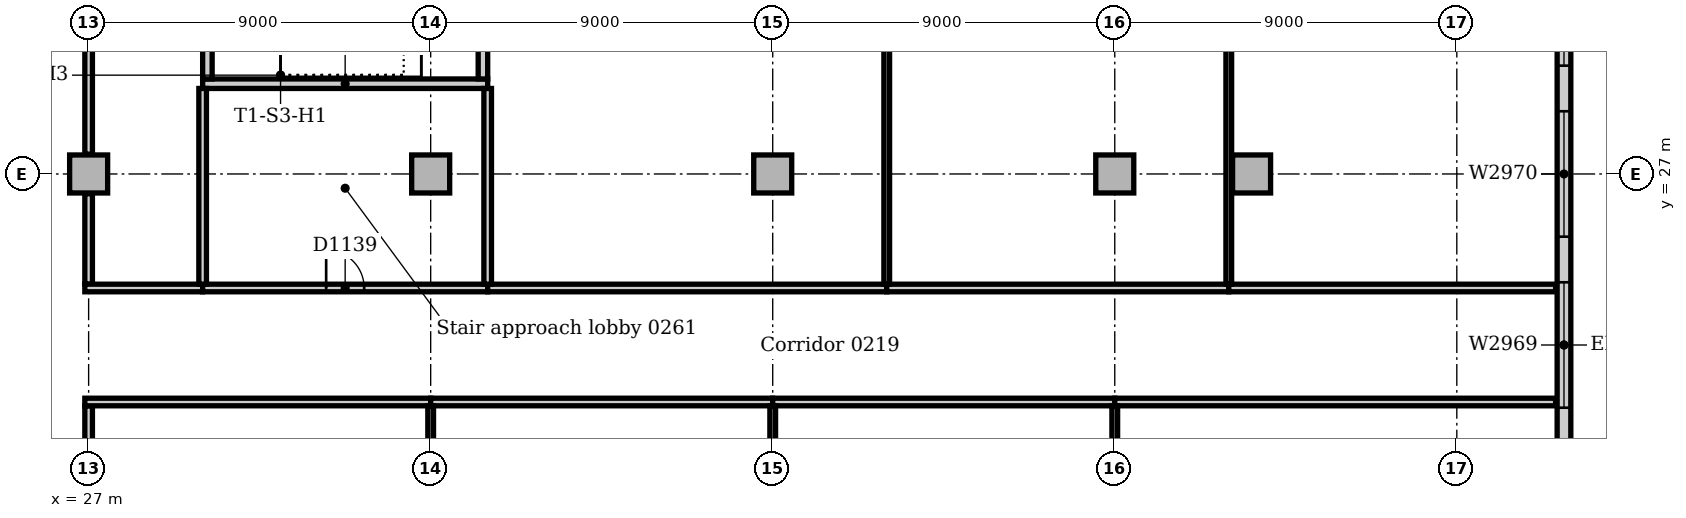
"""IFC4 building model, lengths in metres.
Left out: names, types, materials, properties, quantities, classifications, styles, units other than length and angle.
Written with IfcOpenShell. Run it as: python <this file> out.ifc"""

import sys

from ifc_helpers import new_model, si_unit, direction, frame, frame_2d, origin, origin_2d, place, context, subcontext, project, spatial, rectangle, extrude, element, fill, save


model = new_model("IFC4")
c1 = context("Model", 3, precision=1e-05, world=origin(), true_north=direction((0.0, 1.0)))
c2 = subcontext(c1, "Body", "Model", "MODEL_VIEW")
j1 = project(units=[si_unit("LENGTHUNIT", "METRE"), si_unit("PLANEANGLEUNIT", "RADIAN")], contexts=[c1])
p1 = place(None, origin())
s1 = spatial("IfcSite", under=j1, at=p1, CompositionType="ELEMENT")
p2 = place(p1, origin())
s2 = spatial("IfcBuilding", under=s1, at=p2, CompositionType="ELEMENT")
p3 = place(p2, frame((0.0, 0.0, 11.0)))
s3 = spatial("IfcBuildingStorey", under=s2, at=p3, CompositionType="ELEMENT", Elevation=11.0)
p4 = place(p3, frame((30.0, 29.375, 0.0), z_axis=(0.0, 0.0, 1.0), x_axis=(1.0, 0.0, 0.0)))
e1 = element("IfcWall", 1, at=p4, inside=s3, PredefinedType="SOLIDWALL", context=c2, shape_type="SweptSolid", body=[
    extrude(rectangle(XDim=7.5, YDim=0.25, at=frame_2d((3.75, 0.0))), origin(), (0.0, 0.0, 1.0), 5.0),
])
for number, where, z_axis, x_axis in (
    (2, (37.375, 29.5, 0.0), (0.0, 0.0, 1.0), (0.0, 1.0, 0.0)),
    (3, (30.125, 33.5, 0.0), (0.0, 0.0, 1.0), (0.0, -1.0, 0.0)),
):
    element("IfcWall", number, at=place(p3, frame(where, z_axis=z_axis, x_axis=x_axis)), inside=s3, PredefinedType="SOLIDWALL", context=c2, shape_type="SweptSolid", body=[
        extrude(rectangle(XDim=4.0, YDim=0.25, at=frame_2d((2.0, 0.0))), origin(), (0.0, 0.0, 1.0), 5.0),
    ])
for number, where, z_axis, x_axis in (
    (4, (57.6, 27.0, 0.0), (0.0, 0.0, 1.0), (1.0, 0.0, 0.0)),
    (5, (27.0, 27.0, 0.0), (0.0, 0.0, 1.0), (1.0, 0.0, 0.0)),
    (6, (36.0, 27.0, 0.0), (0.0, 0.0, 1.0), (1.0, 0.0, 0.0)),
    (7, (45.0, 27.0, 0.0), (0.0, 0.0, 1.0), (1.0, 0.0, 0.0)),
    (8, (54.0, 27.0, 0.0), (0.0, 0.0, 1.0), (1.0, 0.0, 0.0)),
):
    element("IfcColumn", number, at=place(p3, frame(where, z_axis=z_axis, x_axis=x_axis)), inside=s3, PredefinedType="COLUMN", context=c2, shape_type="SweptSolid", body=[
        extrude(rectangle(XDim=1.0, YDim=1.0, at=origin_2d()), origin(), (0.0, 0.0, 1.0), 4.7),
    ])
p5 = place(p3, frame((65.82, -9.0, 0.0), z_axis=(0.0, 0.0, 1.0), x_axis=(0.0, 1.0, 0.0)))
e9 = element("IfcWall", 9, at=p5, inside=s3, PredefinedType="STANDARD", context=c2, shape_type="SweptSolid", body=[
    extrude(rectangle(XDim=63.0, YDim=0.36, at=frame_2d((31.5, 0.0))), origin(), (0.0, 0.0, 1.0), 4.7),
])
p6 = place(p5, frame((2.85, 0.0, 0.9)))
e10 = element("IfcOpeningElement", 10, at=p6, cuts=e9, PredefinedType="OPENING", context=c2, shape_type="SweptSolid", body=[
    extrude(rectangle(XDim=3.3, YDim=2.4, at=frame_2d((1.65, 1.2))), frame((0.0, 0.19, 0.0), z_axis=(0.0, -1.0, 0.0), x_axis=(1.0, 0.0, 0.0)), (0.0, 0.0, 1.0), 0.38),
])
p7 = place(p5, frame((7.35, 0.0, 0.9)))
e11 = element("IfcOpeningElement", 11, at=p7, cuts=e9, PredefinedType="OPENING", context=c2, shape_type="SweptSolid", body=[
    extrude(rectangle(XDim=3.3, YDim=2.4, at=frame_2d((1.65, 1.2))), frame((0.0, 0.19, 0.0), z_axis=(0.0, -1.0, 0.0), x_axis=(1.0, 0.0, 0.0)), (0.0, 0.0, 1.0), 0.38),
])
p8 = place(p5, frame((11.85, 0.0, 0.9)))
e12 = element("IfcOpeningElement", 12, at=p8, cuts=e9, PredefinedType="OPENING", context=c2, shape_type="SweptSolid", body=[
    extrude(rectangle(XDim=3.3, YDim=2.4, at=frame_2d((1.65, 1.2))), frame((0.0, 0.19, 0.0), z_axis=(0.0, -1.0, 0.0), x_axis=(1.0, 0.0, 0.0)), (0.0, 0.0, 1.0), 0.38),
])
p9 = place(p5, frame((16.35, 0.0, 0.9)))
e13 = element("IfcOpeningElement", 13, at=p9, cuts=e9, PredefinedType="OPENING", context=c2, shape_type="SweptSolid", body=[
    extrude(rectangle(XDim=3.3, YDim=2.4, at=frame_2d((1.65, 1.2))), frame((0.0, 0.19, 0.0), z_axis=(0.0, -1.0, 0.0), x_axis=(1.0, 0.0, 0.0)), (0.0, 0.0, 1.0), 0.38),
])
p10 = place(p5, frame((20.85, 0.0, 0.9)))
e14 = element("IfcOpeningElement", 14, at=p10, cuts=e9, PredefinedType="OPENING", context=c2, shape_type="SweptSolid", body=[
    extrude(rectangle(XDim=3.3, YDim=2.4, at=frame_2d((1.65, 1.2))), frame((0.0, 0.19, 0.0), z_axis=(0.0, -1.0, 0.0), x_axis=(1.0, 0.0, 0.0)), (0.0, 0.0, 1.0), 0.38),
])
p11 = place(p5, frame((25.35, 0.0, 0.9)))
e15 = element("IfcOpeningElement", 15, at=p11, cuts=e9, PredefinedType="OPENING", context=c2, shape_type="SweptSolid", body=[
    extrude(rectangle(XDim=3.3, YDim=2.4, at=frame_2d((1.65, 1.2))), frame((0.0, 0.19, 0.0), z_axis=(0.0, -1.0, 0.0), x_axis=(1.0, 0.0, 0.0)), (0.0, 0.0, 1.0), 0.38),
])
p12 = place(p5, frame((29.85, 0.0, 0.9)))
e16 = element("IfcOpeningElement", 16, at=p12, cuts=e9, PredefinedType="OPENING", context=c2, shape_type="SweptSolid", body=[
    extrude(rectangle(XDim=3.3, YDim=2.4, at=frame_2d((1.65, 1.2))), frame((0.0, 0.19, 0.0), z_axis=(0.0, -1.0, 0.0), x_axis=(1.0, 0.0, 0.0)), (0.0, 0.0, 1.0), 0.38),
])
p13 = place(p5, frame((34.35, 0.0, 0.9)))
e17 = element("IfcOpeningElement", 17, at=p13, cuts=e9, PredefinedType="OPENING", context=c2, shape_type="SweptSolid", body=[
    extrude(rectangle(XDim=3.3, YDim=2.4, at=frame_2d((1.65, 1.2))), frame((0.0, 0.19, 0.0), z_axis=(0.0, -1.0, 0.0), x_axis=(1.0, 0.0, 0.0)), (0.0, 0.0, 1.0), 0.38),
])
p14 = place(p5, frame((38.85, 0.0, 0.9)))
e18 = element("IfcOpeningElement", 18, at=p14, cuts=e9, PredefinedType="OPENING", context=c2, shape_type="SweptSolid", body=[
    extrude(rectangle(XDim=3.3, YDim=2.4, at=frame_2d((1.65, 1.2))), frame((0.0, 0.19, 0.0), z_axis=(0.0, -1.0, 0.0), x_axis=(1.0, 0.0, 0.0)), (0.0, 0.0, 1.0), 0.38),
])
p15 = place(p5, frame((43.35, 0.0, 0.9)))
e19 = element("IfcOpeningElement", 19, at=p15, cuts=e9, PredefinedType="OPENING", context=c2, shape_type="SweptSolid", body=[
    extrude(rectangle(XDim=3.3, YDim=2.4, at=frame_2d((1.65, 1.2))), frame((0.0, 0.19, 0.0), z_axis=(0.0, -1.0, 0.0), x_axis=(1.0, 0.0, 0.0)), (0.0, 0.0, 1.0), 0.38),
])
p16 = place(p5, frame((47.85, 0.0, 0.9)))
e20 = element("IfcOpeningElement", 20, at=p16, cuts=e9, PredefinedType="OPENING", context=c2, shape_type="SweptSolid", body=[
    extrude(rectangle(XDim=3.3, YDim=2.4, at=frame_2d((1.65, 1.2))), frame((0.0, 0.19, 0.0), z_axis=(0.0, -1.0, 0.0), x_axis=(1.0, 0.0, 0.0)), (0.0, 0.0, 1.0), 0.38),
])
p17 = place(p5, frame((52.35, 0.0, 0.9)))
e21 = element("IfcOpeningElement", 21, at=p17, cuts=e9, PredefinedType="OPENING", context=c2, shape_type="SweptSolid", body=[
    extrude(rectangle(XDim=3.3, YDim=2.4, at=frame_2d((1.65, 1.2))), frame((0.0, 0.19, 0.0), z_axis=(0.0, -1.0, 0.0), x_axis=(1.0, 0.0, 0.0)), (0.0, 0.0, 1.0), 0.38),
])
p18 = place(p5, frame((56.85, 0.0, 0.9)))
e22 = element("IfcOpeningElement", 22, at=p18, cuts=e9, PredefinedType="OPENING", context=c2, shape_type="SweptSolid", body=[
    extrude(rectangle(XDim=3.3, YDim=2.4, at=frame_2d((1.65, 1.2))), frame((0.0, 0.19, 0.0), z_axis=(0.0, -1.0, 0.0), x_axis=(1.0, 0.0, 0.0)), (0.0, 0.0, 1.0), 0.38),
])
for number, where, z_axis, x_axis in (
    (23, (27.0, 18.52, 0.0), (0.0, 0.0, 1.0), (0.0, 1.0, 0.0)),
    (24, (27.0, 24.1, 0.0), (0.0, 0.0, 1.0), (0.0, 1.0, 0.0)),
):
    element("IfcWall", number, at=place(p3, frame(where, z_axis=z_axis, x_axis=x_axis)), inside=s3, PredefinedType="PARTITIONING", context=c2, shape_type="SweptSolid", body=[
        extrude(rectangle(XDim=2.38, YDim=0.2, at=frame_2d((1.19, 0.0))), origin(), (0.0, 0.0, 1.0), 4.7),
    ])
p19 = place(p3, frame((27.0, 27.52, 0.0), z_axis=(0.0, 0.0, 1.0), x_axis=(0.0, 1.0, 0.0)))
e25 = element("IfcWall", 25, at=p19, inside=s3, PredefinedType="PARTITIONING", context=c2, shape_type="SweptSolid", body=[
    extrude(rectangle(XDim=7.96, YDim=0.2, at=frame_2d((3.98, 0.0))), origin(), (0.0, 0.0, 1.0), 4.7),
])
p20 = place(p19, frame((4.98, 0.0, 0.0)))
e26 = element("IfcOpeningElement", 26, at=p20, cuts=e25, PredefinedType="OPENING", context=c2, shape_type="SweptSolid", body=[
    extrude(rectangle(XDim=1.0, YDim=2.1, at=frame_2d((0.5, 1.05))), frame((0.0, 0.11, 0.0), z_axis=(0.0, -1.0, 0.0), x_axis=(1.0, 0.0, 0.0)), (0.0, 0.0, 1.0), 0.22),
])
p21 = place(p3, frame((26.9, 21.0, 0.0), z_axis=(0.0, 0.0, 1.0), x_axis=(1.0, 0.0, 0.0)))
e27 = element("IfcWall", 27, at=p21, inside=s3, PredefinedType="PARTITIONING", context=c2, shape_type="SweptSolid", body=[
    extrude(rectangle(XDim=9.1, YDim=0.2, at=frame_2d((4.55, 0.0))), origin(), (0.0, 0.0, 1.0), 4.7),
])
for number, where, z_axis, x_axis in (
    (28, (36.0, 21.0, 0.0), (0.0, 0.0, 1.0), (1.0, 0.0, 0.0)),
    (29, (45.0, 21.0, 0.0), (0.0, 0.0, 1.0), (1.0, 0.0, 0.0)),
):
    element("IfcWall", number, at=place(p3, frame(where, z_axis=z_axis, x_axis=x_axis)), inside=s3, PredefinedType="PARTITIONING", context=c2, shape_type="SweptSolid", body=[
        extrude(rectangle(XDim=9.0, YDim=0.2, at=frame_2d((4.5, 0.0))), origin(), (0.0, 0.0, 1.0), 4.7),
    ])
p22 = place(p3, frame((54.0, 21.0, 0.0), z_axis=(0.0, 0.0, 1.0), x_axis=(1.0, 0.0, 0.0)))
e30 = element("IfcWall", 30, at=p22, inside=s3, PredefinedType="PARTITIONING", context=c2, shape_type="SweptSolid", body=[
    extrude(rectangle(XDim=11.6, YDim=0.2, at=frame_2d((5.8, 0.0))), origin(), (0.0, 0.0, 1.0), 4.7),
])
p23 = place(p3, frame((26.9, 24.0, 0.0), z_axis=(0.0, 0.0, 1.0), x_axis=(1.0, 0.0, 0.0)))
e31 = element("IfcWall", 31, at=p23, inside=s3, PredefinedType="PARTITIONING", context=c2, shape_type="SweptSolid", body=[
    extrude(rectangle(XDim=3.1, YDim=0.2, at=frame_2d((1.55, 0.0))), origin(), (0.0, 0.0, 1.0), 4.7),
])
p24 = place(p3, frame((30.0, 24.0, 0.0), z_axis=(0.0, 0.0, 1.0), x_axis=(1.0, 0.0, 0.0)))
e32 = element("IfcWall", 32, at=p24, inside=s3, PredefinedType="PARTITIONING", context=c2, shape_type="SweptSolid", body=[
    extrude(rectangle(XDim=7.5, YDim=0.2, at=frame_2d((3.75, 0.0))), origin(), (0.0, 0.0, 1.0), 4.7),
])
p25 = place(p24, frame((3.25, 0.0, 0.0)))
e33 = element("IfcOpeningElement", 33, at=p25, cuts=e32, PredefinedType="OPENING", context=c2, shape_type="SweptSolid", body=[
    extrude(rectangle(XDim=1.0, YDim=2.1, at=frame_2d((0.5, 1.05))), frame((0.0, 0.11, 0.0), z_axis=(0.0, -1.0, 0.0), x_axis=(1.0, 0.0, 0.0)), (0.0, 0.0, 1.0), 0.22),
])
p26 = place(p3, frame((37.5, 24.0, 0.0), z_axis=(0.0, 0.0, 1.0), x_axis=(1.0, 0.0, 0.0)))
e34 = element("IfcWall", 34, at=p26, inside=s3, PredefinedType="PARTITIONING", context=c2, shape_type="SweptSolid", body=[
    extrude(rectangle(XDim=10.5, YDim=0.2, at=frame_2d((5.25, 0.0))), origin(), (0.0, 0.0, 1.0), 4.7),
])
p27 = place(p3, frame((48.0, 24.0, 0.0), z_axis=(0.0, 0.0, 1.0), x_axis=(1.0, 0.0, 0.0)))
e35 = element("IfcWall", 35, at=p27, inside=s3, PredefinedType="PARTITIONING", context=c2, shape_type="SweptSolid", body=[
    extrude(rectangle(XDim=9.0, YDim=0.2, at=frame_2d((4.5, 0.0))), origin(), (0.0, 0.0, 1.0), 4.7),
])
p28 = place(p3, frame((57.0, 24.0, 0.0), z_axis=(0.0, 0.0, 1.0), x_axis=(1.0, 0.0, 0.0)))
e36 = element("IfcWall", 36, at=p28, inside=s3, PredefinedType="PARTITIONING", context=c2, shape_type="SweptSolid", body=[
    extrude(rectangle(XDim=8.6, YDim=0.2, at=frame_2d((4.3, 0.0))), origin(), (0.0, 0.0, 1.0), 4.7),
])
for number, where, z_axis, x_axis in (
    (37, (36.0, 18.52, 0.0), (0.0, 0.0, 1.0), (0.0, 1.0, 0.0)),
    (38, (45.0, 18.52, 0.0), (0.0, 0.0, 1.0), (0.0, 1.0, 0.0)),
    (39, (54.0, 18.52, 0.0), (0.0, 0.0, 1.0), (0.0, 1.0, 0.0)),
):
    element("IfcWall", number, at=place(p3, frame(where, z_axis=z_axis, x_axis=x_axis)), inside=s3, PredefinedType="PARTITIONING", context=c2, shape_type="SweptSolid", body=[
        extrude(rectangle(XDim=2.38, YDim=0.15, at=frame_2d((1.19, 0.0))), origin(), (0.0, 0.0, 1.0), 4.7),
    ])
for number, where, z_axis, x_axis in (
    (40, (30.0, 24.1, 0.0), (0.0, 0.0, 1.0), (0.0, 1.0, 0.0)),
    (41, (37.5, 24.1, 0.0), (0.0, 0.0, 1.0), (0.0, 1.0, 0.0)),
):
    element("IfcWall", number, at=place(p3, frame(where, z_axis=z_axis, x_axis=x_axis)), inside=s3, PredefinedType="PARTITIONING", context=c2, shape_type="SweptSolid", body=[
        extrude(rectangle(XDim=5.15, YDim=0.2, at=frame_2d((2.575, 0.0))), origin(), (0.0, 0.0, 1.0), 4.7),
    ])
p29 = place(p3, frame((48.0, 24.1, 0.0), z_axis=(0.0, 0.0, 1.0), x_axis=(0.0, 1.0, 0.0)))
e42 = element("IfcWall", 42, at=p29, inside=s3, PredefinedType="PARTITIONING", context=c2, shape_type="SweptSolid", body=[
    extrude(rectangle(XDim=17.8, YDim=0.15, at=frame_2d((8.9, 0.0))), origin(), (0.0, 0.0, 1.0), 4.7),
])
p30 = place(p3, frame((57.0, 24.1, 0.0), z_axis=(0.0, 0.0, 1.0), x_axis=(0.0, 1.0, 0.0)))
e43 = element("IfcWall", 43, at=p30, inside=s3, PredefinedType="PARTITIONING", context=c2, shape_type="SweptSolid", body=[
    extrude(rectangle(XDim=10.678, YDim=0.15, at=frame_2d((5.339, 0.0))), origin(), (0.0, 0.0, 1.0), 4.7),
])
p31 = place(p12, origin())
e44 = element("IfcWindow", 44, at=p31, inside=s3, PartitioningType="SINGLE_PANEL", PredefinedType="WINDOW", context=c2, shape_type="SweptSolid", body=[
    extrude(rectangle(XDim=3.3, YDim=2.4, at=frame_2d((1.65, 1.2))), frame((0.0, 0.13, 0.0), z_axis=(0.0, -1.0, 0.0), x_axis=(1.0, 0.0, 0.0)), (0.0, 0.0, 1.0), 0.06),
])
fill(e16, e44)
p32 = place(p13, origin())
e45 = element("IfcWindow", 45, at=p32, inside=s3, PartitioningType="SINGLE_PANEL", PredefinedType="WINDOW", context=c2, shape_type="SweptSolid", body=[
    extrude(rectangle(XDim=3.3, YDim=2.4, at=frame_2d((1.65, 1.2))), frame((0.0, 0.13, 0.0), z_axis=(0.0, -1.0, 0.0), x_axis=(1.0, 0.0, 0.0)), (0.0, 0.0, 1.0), 0.06),
])
fill(e17, e45)
p33 = place(p14, origin())
e46 = element("IfcWindow", 46, at=p33, inside=s3, PartitioningType="SINGLE_PANEL", PredefinedType="WINDOW", context=c2, shape_type="SweptSolid", body=[
    extrude(rectangle(XDim=3.3, YDim=2.4, at=frame_2d((1.65, 1.2))), frame((0.0, 0.13, 0.0), z_axis=(0.0, -1.0, 0.0), x_axis=(1.0, 0.0, 0.0)), (0.0, 0.0, 1.0), 0.06),
])
fill(e18, e46)
p34 = place(p25, origin())
e47 = element("IfcDoor", 47, at=p34, inside=s3, OperationType="SINGLE_SWING_LEFT", PredefinedType="DOOR", context=c2, shape_type="SweptSolid", body=[
    extrude(rectangle(XDim=1.0, YDim=2.1, at=frame_2d((0.5, 1.05))), frame((0.0, 0.025, 0.0), z_axis=(0.0, -1.0, 0.0), x_axis=(1.0, 0.0, 0.0)), (0.0, 0.0, 1.0), 0.05),
])
fill(e33, e47)
save(model, sys.argv[1])
